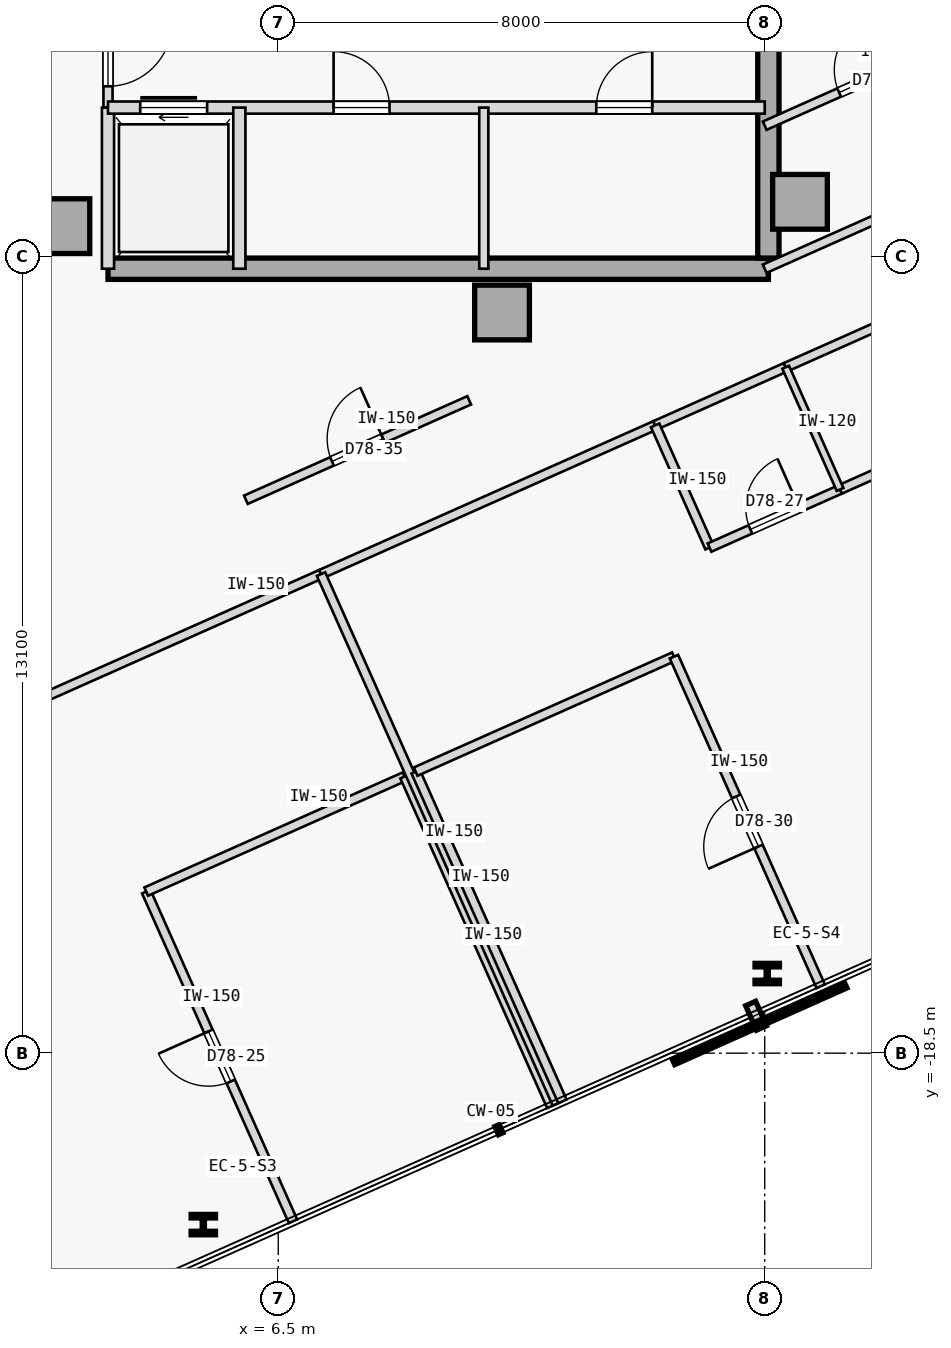
"""IFC4 building model, lengths in metres.
Left out: names, types, materials, properties, quantities, classifications, styles, units other than length and angle.
Written with IfcOpenShell. Run it as: python <this file> out.ifc"""

import sys

from ifc_helpers import new_model, si_unit, direction, frame, frame_2d, origin, origin_2d, place, context, subcontext, project, spatial, rectangle, i_section, extrude, element, fill, save


model = new_model("IFC4")
c1 = context("Model", 3, precision=1e-05, world=origin(), true_north=direction((0.0, 1.0)))
c2 = subcontext(c1, "Body", "Model", "MODEL_VIEW")
j1 = project(units=[si_unit("LENGTHUNIT", "METRE"), si_unit("PLANEANGLEUNIT", "RADIAN")], contexts=[c1])
p1 = place(None, origin())
s1 = spatial("IfcSite", under=j1, at=p1, CompositionType="ELEMENT")
p2 = place(p1, origin())
s2 = spatial("IfcBuilding", under=s1, at=p2, CompositionType="ELEMENT")
p3 = place(p2, frame((0.0, 0.0, 291.95)))
s3 = spatial("IfcBuildingStorey", under=s2, at=p3, CompositionType="ELEMENT", Elevation=291.95)
for number, where, z_axis, x_axis in (
    (1, (15.08, -4.5, 0.0), (0.0, 0.0, 1.0), (1.0, 0.0, 0.0)),
    (2, (10.18, -6.32, 0.0), (0.0, 0.0, 1.0), (1.0, 0.0, 0.0)),
    (3, (2.95, -4.9, 0.0), (0.0, 0.0, 1.0), (1.0, 0.0, 0.0)),
):
    element("IfcColumn", number, at=place(p3, frame(where, z_axis=z_axis, x_axis=x_axis)), inside=s3, PredefinedType="COLUMN", context=c2, shape_type="SweptSolid", body=[
        extrude(rectangle(XDim=0.9, YDim=0.9, at=origin_2d()), origin(), (0.0, 0.0, 1.0), 3.35),
    ])
p4 = place(p3, frame((3.7, -5.6, 0.0), z_axis=(0.0, 0.0, 1.0), x_axis=(1.0, 0.0, 0.0)))
e4 = element("IfcWall", 4, at=p4, inside=s3, PredefinedType="SHEAR", context=c2, shape_type="SweptSolid", body=[
    extrude(rectangle(XDim=10.86, YDim=0.35, at=frame_2d((5.43, 0.0))), origin(), (0.0, 0.0, 1.0), 3.125),
])
p5 = place(p3, frame((14.56, -5.425, 0.0), z_axis=(0.0, 0.0, 1.0), x_axis=(0.0, 1.0, 0.0)))
e5 = element("IfcWall", 5, at=p5, inside=s3, PredefinedType="SHEAR", context=c2, shape_type="SweptSolid", body=[
    extrude(rectangle(XDim=10.85, YDim=0.35, at=frame_2d((5.425, 0.0))), origin(), (0.0, 0.0, 1.0), 3.125),
])
for number, where, z_axis, x_axis in (
    (6, (5.268, -21.319, 0.0), (0.0, 0.0, 1.0), (1.0, 0.0, 0.0)),
    (7, (14.541, -17.19, 0.0), (0.0, 0.0, 1.0), (1.0, 0.0, 0.0)),
):
    element("IfcColumn", number, at=place(p3, frame(where, z_axis=z_axis, x_axis=x_axis)), inside=s3, PredefinedType="COLUMN", context=c2, shape_type="SweptSolid", body=[
        extrude(i_section(OverallWidth=0.401, OverallDepth=0.335, WebThickness=0.036, FlangeThickness=0.058, FilletRadius=0.015, at=origin_2d()), origin(), (0.0, 0.0, 1.0), 3.35),
    ])
p6 = place(p3, frame((3.7, -2.95, 0.0), z_axis=(0.0, 0.0, 1.0), x_axis=(0.0, 1.0, 0.0)))
e8 = element("IfcWall", 8, at=p6, inside=s3, PredefinedType="PARTITIONING", context=c2, shape_type="SweptSolid", body=[
    extrude(rectangle(XDim=1.8, YDim=0.15, at=frame_2d((0.9, 0.0))), origin(), (0.0, 0.0, 1.0), 3.125),
])
p7 = place(p6, frame((0.35, 0.0, 0.0)))
e9 = element("IfcOpeningElement", 9, at=p7, cuts=e8, PredefinedType="OPENING", context=c2, shape_type="SweptSolid", body=[
    extrude(rectangle(XDim=1.05, YDim=2.18, at=frame_2d((0.525, 1.09))), frame((0.0, 0.085, 0.0), z_axis=(0.0, -1.0, 0.0), x_axis=(1.0, 0.0, 0.0)), (0.0, 0.0, 1.0), 0.17),
])
p8 = place(p3, frame((3.7, -5.6, 0.0), z_axis=(0.0, 0.0, 1.0), x_axis=(0.0, 1.0, 0.0)))
e10 = element("IfcWall", 10, at=p8, inside=s3, PredefinedType="STANDARD", context=c2, shape_type="SweptSolid", body=[
    extrude(rectangle(XDim=2.65, YDim=0.2, at=frame_2d((1.325, 0.0))), origin(), (0.0, 0.0, 1.0), 3.125),
])
p9 = place(p3, frame((3.7, -2.95, 0.0), z_axis=(0.0, 0.0, 1.0), x_axis=(1.0, 0.0, 0.0)))
e11 = element("IfcWall", 11, at=p9, inside=s3, PredefinedType="STANDARD", context=c2, shape_type="SweptSolid", body=[
    extrude(rectangle(XDim=10.8, YDim=0.2, at=frame_2d((5.4, 0.0))), origin(), (0.0, 0.0, 1.0), 3.125),
])
p10 = place(p9, frame((0.53, 0.0, 0.0)))
e12 = element("IfcOpeningElement", 12, at=p10, cuts=e11, PredefinedType="OPENING", context=c2, shape_type="SweptSolid", body=[
    extrude(rectangle(XDim=1.1, YDim=2.15, at=frame_2d((0.55, 1.075))), frame((0.0, 0.11, 0.0), z_axis=(0.0, -1.0, 0.0), x_axis=(1.0, 0.0, 0.0)), (0.0, 0.0, 1.0), 0.22),
])
p11 = place(p9, frame((3.71, 0.0, 0.0)))
e13 = element("IfcOpeningElement", 13, at=p11, cuts=e11, PredefinedType="OPENING", context=c2, shape_type="SweptSolid", body=[
    extrude(rectangle(XDim=0.92, YDim=2.15, at=frame_2d((0.46, 1.075))), frame((0.0, 0.11, 0.0), z_axis=(0.0, -1.0, 0.0), x_axis=(1.0, 0.0, 0.0)), (0.0, 0.0, 1.0), 0.22),
])
p12 = place(p9, frame((8.03, 0.0, 0.0)))
e14 = element("IfcOpeningElement", 14, at=p12, cuts=e11, PredefinedType="OPENING", context=c2, shape_type="SweptSolid", body=[
    extrude(rectangle(XDim=0.92, YDim=2.15, at=frame_2d((0.46, 1.075))), frame((0.0, 0.11, 0.0), z_axis=(0.0, -1.0, 0.0), x_axis=(1.0, 0.0, 0.0)), (0.0, 0.0, 1.0), 0.22),
])
p13 = place(p3, frame((5.86, -5.6, 0.0), z_axis=(0.0, 0.0, 1.0), x_axis=(0.0, 1.0, 0.0)))
e15 = element("IfcWall", 15, at=p13, inside=s3, PredefinedType="STANDARD", context=c2, shape_type="SweptSolid", body=[
    extrude(rectangle(XDim=2.65, YDim=0.2, at=frame_2d((1.325, 0.0))), origin(), (0.0, 0.0, 1.0), 3.125),
])
p14 = place(p3, frame((9.88, -5.6, 0.0), z_axis=(0.0, 0.0, 1.0), x_axis=(0.0, 1.0, 0.0)))
e16 = element("IfcWall", 16, at=p14, inside=s3, PredefinedType="PARTITIONING", context=c2, shape_type="SweptSolid", body=[
    extrude(rectangle(XDim=2.65, YDim=0.15, at=frame_2d((1.325, 0.0))), origin(), (0.0, 0.0, 1.0), 3.125),
])
p15 = place(p3, frame((-4.445, -15.808, 0.0), z_axis=(0.0, 0.0, 1.0), x_axis=(0.913546853922, 0.406733506966, 0.0)))
e17 = element("IfcWall", 17, at=p15, inside=s3, PredefinedType="PARTITIONING", context=c2, shape_type="SweptSolid", body=[
    extrude(rectangle(XDim=12.751, YDim=0.15, at=frame_2d((6.375, 0.0))), origin(), (0.0, 0.0, 1.0), 3.125),
])
p16 = place(p15, frame((5.9, 0.0, 0.0)))
e18 = element("IfcOpeningElement", 18, at=p16, cuts=e17, PredefinedType="OPENING", context=c2, shape_type="SweptSolid", body=[
    extrude(rectangle(XDim=0.95, YDim=2.15, at=frame_2d((0.475, 1.075))), frame((0.0, 0.085, 0.0), z_axis=(0.0, -1.0, 0.0), x_axis=(1.0, 0.0, 0.0)), (0.0, 0.0, 1.0), 0.17),
])
p17 = place(p3, frame((7.204, -10.622, 0.0), z_axis=(0.0, 0.0, 1.0), x_axis=(0.913545172627, 0.406737283231, 0.0)))
e19 = element("IfcWall", 19, at=p17, inside=s3, PredefinedType="PARTITIONING", context=c2, shape_type="SweptSolid", body=[
    extrude(rectangle(XDim=6.014, YDim=0.15, at=frame_2d((3.007, 0.0))), origin(), (0.0, 0.0, 1.0), 3.125),
])
p18 = place(p3, frame((12.698, -8.176, 0.0), z_axis=(0.0, 0.0, 1.0), x_axis=(0.913558622212, 0.406707073682, 0.0)))
e20 = element("IfcWall", 20, at=p18, inside=s3, PredefinedType="PARTITIONING", context=c2, shape_type="SweptSolid", body=[
    extrude(rectangle(XDim=2.35, YDim=0.15, at=frame_2d((1.175, 0.0))), origin(), (0.0, 0.0, 1.0), 3.125),
])
p19 = place(p3, frame((14.844, -7.22, 0.0), z_axis=(0.0, 0.0, 1.0), x_axis=(0.913524337797, 0.406784075711, 0.0)))
e21 = element("IfcWall", 21, at=p19, inside=s3, PredefinedType="PARTITIONING", context=c2, shape_type="SweptSolid", body=[
    extrude(rectangle(XDim=4.35, YDim=0.15, at=frame_2d((2.175, 0.0))), origin(), (0.0, 0.0, 1.0), 3.125),
])
p20 = place(p3, frame((5.968, -9.399, 0.0), z_axis=(0.0, 0.0, 1.0), x_axis=(0.913563383118, 0.406696379412, 0.0)))
e22 = element("IfcWall", 22, at=p20, inside=s3, PredefinedType="PARTITIONING", context=c2, shape_type="SweptSolid", body=[
    extrude(rectangle(XDim=4.019, YDim=0.15, at=frame_2d((2.01, 0.0))), origin(), (0.0, 0.0, 1.0), 3.125),
])
p21 = place(p20, frame((1.55, 0.0, 0.0)))
e23 = element("IfcOpeningElement", 23, at=p21, cuts=e22, PredefinedType="OPENING", context=c2, shape_type="SweptSolid", body=[
    extrude(rectangle(XDim=0.92, YDim=2.15, at=frame_2d((0.46, 1.075))), frame((0.0, 0.085, 0.0), z_axis=(0.0, -1.0, 0.0), x_axis=(1.0, 0.0, 0.0)), (0.0, 0.0, 1.0), 0.17),
])
p22 = place(p3, frame((14.5, -5.6, 0.0), z_axis=(0.0, 0.0, 1.0), x_axis=(0.913550607208, 0.406725076766, 0.0)))
e24 = element("IfcWall", 24, at=p22, inside=s3, PredefinedType="PARTITIONING", context=c2, shape_type="SweptSolid", body=[
    extrude(rectangle(XDim=4.556, YDim=0.15, at=frame_2d((2.278, 0.0))), origin(), (0.0, 0.0, 1.0), 3.125),
])
p23 = place(p22, frame((2.501, 0.0, 0.0)))
e25 = element("IfcOpeningElement", 25, at=p23, cuts=e24, PredefinedType="OPENING", context=c2, shape_type="SweptSolid", body=[
    extrude(rectangle(XDim=0.92, YDim=2.15, at=frame_2d((0.46, 1.075))), frame((0.0, 0.085, 0.0), z_axis=(0.0, -1.0, 0.0), x_axis=(1.0, 0.0, 0.0)), (0.0, 0.0, 1.0), 0.17),
])
p24 = place(p3, frame((6.742, -21.265, 0.0), z_axis=(0.0, 0.0, 1.0), x_axis=(-0.406749048544, 0.913539934271, 0.0)))
e26 = element("IfcWall", 26, at=p24, inside=s3, PredefinedType="PARTITIONING", context=c2, shape_type="SweptSolid", body=[
    extrude(rectangle(XDim=5.935, YDim=0.15, at=frame_2d((2.968, 0.0))), origin(), (0.0, 0.0, 1.0), 3.125),
])
p25 = place(p24, frame((2.518, 0.0, 0.0)))
e27 = element("IfcOpeningElement", 27, at=p25, cuts=e26, PredefinedType="OPENING", context=c2, shape_type="SweptSolid", body=[
    extrude(rectangle(XDim=0.9, YDim=2.15, at=frame_2d((0.45, 1.075))), frame((0.0, 0.085, 0.0), z_axis=(0.0, -1.0, 0.0), x_axis=(1.0, 0.0, 0.0)), (0.0, 0.0, 1.0), 0.17),
])
p26 = place(p3, frame((4.328, -15.843, 0.0), z_axis=(0.0, 0.0, 1.0), x_axis=(0.91354505039, 0.40673755778, 0.0)))
e28 = element("IfcWall", 28, at=p26, inside=s3, PredefinedType="PARTITIONING", context=c2, shape_type="SweptSolid", body=[
    extrude(rectangle(XDim=4.65, YDim=0.15, at=frame_2d((2.325, 0.0))), origin(), (0.0, 0.0, 1.0), 3.125),
])
p27 = place(p3, frame((10.99, -19.373, 0.0), z_axis=(0.0, 0.0, 1.0), x_axis=(-0.406749048544, 0.913539934271, 0.0)))
e29 = element("IfcWall", 29, at=p27, inside=s3, PredefinedType="PARTITIONING", context=c2, shape_type="SweptSolid", body=[
    extrude(rectangle(XDim=5.935, YDim=0.15, at=frame_2d((2.968, 0.0))), origin(), (0.0, 0.0, 1.0), 3.125),
])
p28 = place(p3, frame((11.082, -19.333, 0.0), z_axis=(0.0, 0.0, 1.0), x_axis=(-0.406729927653, 0.913548447512, 0.0)))
e30 = element("IfcWall", 30, at=p28, inside=s3, PredefinedType="PARTITIONING", context=c2, shape_type="SweptSolid", body=[
    extrude(rectangle(XDim=9.535, YDim=0.15, at=frame_2d((4.768, 0.0))), origin(), (0.0, 0.0, 1.0), 3.125),
])
p29 = place(p3, frame((13.592, -10.186, 0.0), z_axis=(0.0, 0.0, 1.0), x_axis=(-0.406725294076, 0.913550510459, 0.0)))
e31 = element("IfcWall", 31, at=p29, inside=s3, PredefinedType="PARTITIONING", context=c2, shape_type="SweptSolid", body=[
    extrude(rectangle(XDim=2.2, YDim=0.15, at=frame_2d((1.1, 0.0))), origin(), (0.0, 0.0, 1.0), 3.125),
])
p30 = place(p3, frame((13.592, -10.186, 0.0), z_axis=(0.0, 0.0, 1.0), x_axis=(0.913558622212, 0.406707073682, 0.0)))
e32 = element("IfcWall", 32, at=p30, inside=s3, PredefinedType="PARTITIONING", context=c2, shape_type="SweptSolid", body=[
    extrude(rectangle(XDim=2.35, YDim=0.15, at=frame_2d((1.175, 0.0))), origin(), (0.0, 0.0, 1.0), 3.125),
])
p31 = place(p30, frame((0.735, 0.0, 0.0)))
e33 = element("IfcOpeningElement", 33, at=p31, cuts=e32, PredefinedType="OPENING", context=c2, shape_type="SweptSolid", body=[
    extrude(rectangle(XDim=0.88, YDim=2.15, at=frame_2d((0.44, 1.075))), frame((0.0, 0.085, 0.0), z_axis=(0.0, -1.0, 0.0), x_axis=(1.0, 0.0, 0.0)), (0.0, 0.0, 1.0), 0.17),
])
p32 = place(p3, frame((15.739, -9.23, 0.0), z_axis=(0.0, 0.0, 1.0), x_axis=(0.913545193015, 0.406737237438, 0.0)))
e34 = element("IfcWall", 34, at=p32, inside=s3, PredefinedType="PARTITIONING", context=c2, shape_type="SweptSolid", body=[
    extrude(rectangle(XDim=4.35, YDim=0.15, at=frame_2d((2.175, 0.0))), origin(), (0.0, 0.0, 1.0), 3.125),
])
p33 = place(p32, frame((1.725, 0.0, 0.0)))
e35 = element("IfcOpeningElement", 35, at=p33, cuts=e34, PredefinedType="OPENING", context=c2, shape_type="SweptSolid", body=[
    extrude(rectangle(XDim=0.9, YDim=2.15, at=frame_2d((0.45, 1.075))), frame((0.0, 0.085, 0.0), z_axis=(0.0, -1.0, 0.0), x_axis=(1.0, 0.0, 0.0)), (0.0, 0.0, 1.0), 0.17),
])
p34 = place(p3, frame((11.173, -19.292, 0.0), z_axis=(0.0, 0.0, 1.0), x_axis=(-0.406749048544, 0.913539934271, 0.0)))
e36 = element("IfcWall", 36, at=p34, inside=s3, PredefinedType="PARTITIONING", context=c2, shape_type="SweptSolid", body=[
    extrude(rectangle(XDim=5.935, YDim=0.15, at=frame_2d((2.968, 0.0))), origin(), (0.0, 0.0, 1.0), 3.125),
])
p35 = place(p3, frame((8.759, -13.87, 0.0), z_axis=(0.0, 0.0, 1.0), x_axis=(0.91354505039, 0.40673755778, 0.0)))
e37 = element("IfcWall", 37, at=p35, inside=s3, PredefinedType="PARTITIONING", context=c2, shape_type="SweptSolid", body=[
    extrude(rectangle(XDim=4.65, YDim=0.15, at=frame_2d((2.325, 0.0))), origin(), (0.0, 0.0, 1.0), 3.125),
])
p36 = place(p3, frame((15.421, -17.401, 0.0), z_axis=(0.0, 0.0, 1.0), x_axis=(-0.406749048544, 0.913539934271, 0.0)))
e38 = element("IfcWall", 38, at=p36, inside=s3, PredefinedType="PARTITIONING", context=c2, shape_type="SweptSolid", body=[
    extrude(rectangle(XDim=5.935, YDim=0.15, at=frame_2d((2.968, 0.0))), origin(), (0.0, 0.0, 1.0), 3.125),
])
p37 = place(p36, frame((2.518, 0.0, 0.0)))
e39 = element("IfcOpeningElement", 39, at=p37, cuts=e38, PredefinedType="OPENING", context=c2, shape_type="SweptSolid", body=[
    extrude(rectangle(XDim=0.9, YDim=2.15, at=frame_2d((0.45, 1.075))), frame((0.0, 0.085, 0.0), z_axis=(0.0, -1.0, 0.0), x_axis=(1.0, 0.0, 0.0)), (0.0, 0.0, 1.0), 0.17),
])
p38 = place(p3, frame((15.739, -9.23, 0.0), z_axis=(0.0, 0.0, 1.0), x_axis=(-0.406725294076, 0.913550510459, 0.0)))
e40 = element("IfcWall", 40, at=p38, inside=s3, PredefinedType="PARTITIONING", context=c2, shape_type="SweptSolid", body=[
    extrude(rectangle(XDim=2.2, YDim=0.12, at=frame_2d((1.1, 0.0))), origin(), (0.0, 0.0, 1.0), 3.125),
])
p39 = place(p3, frame((14.5, -3.248, 0.0), z_axis=(0.0, 0.0, 1.0), x_axis=(0.913542803573, 0.40674260416, 0.0)))
e41 = element("IfcWall", 41, at=p39, inside=s3, PredefinedType="PARTITIONING", context=c2, shape_type="SweptSolid", body=[
    extrude(rectangle(XDim=3.599, YDim=0.15, at=frame_2d((1.8, 0.0))), origin(), (0.0, 0.0, 1.0), 3.125),
])
p40 = place(p39, frame((1.34, 0.0, 0.0)))
e42 = element("IfcOpeningElement", 42, at=p40, cuts=e41, PredefinedType="OPENING", context=c2, shape_type="SweptSolid", body=[
    extrude(rectangle(XDim=0.92, YDim=2.15, at=frame_2d((0.46, 1.075))), frame((0.0, 0.085, 0.0), z_axis=(0.0, -1.0, 0.0), x_axis=(1.0, 0.0, 0.0)), (0.0, 0.0, 1.0), 0.17),
])
p41 = place(p7, frame((1.05, 0.0, 0.0), z_axis=(0.0, 0.0, 1.0), x_axis=(-1.0, 0.0, 0.0)))
e43 = element("IfcDoor", 43, at=p41, inside=s3, OperationType="SINGLE_SWING_RIGHT", PredefinedType="DOOR", context=c2, shape_type="SweptSolid", body=[
    extrude(rectangle(XDim=1.05, YDim=2.18, at=frame_2d((0.525, 1.09))), frame((0.0, 0.025, 0.0), z_axis=(0.0, -1.0, 0.0), x_axis=(1.0, 0.0, 0.0)), (0.0, 0.0, 1.0), 0.05),
])
fill(e9, e43)
p42 = place(p10, origin())
e44 = element("IfcDoor", 44, at=p42, inside=s3, OperationType="SLIDING_TO_RIGHT", PredefinedType="DOOR", context=c2, shape_type="SweptSolid", body=[
    extrude(rectangle(XDim=1.1, YDim=2.15, at=frame_2d((0.55, 1.075))), frame((0.0, 0.025, 0.0), z_axis=(0.0, -1.0, 0.0), x_axis=(1.0, 0.0, 0.0)), (0.0, 0.0, 1.0), 0.05),
])
fill(e12, e44)
p43 = place(p11, origin())
e45 = element("IfcDoor", 45, at=p43, inside=s3, OperationType="SINGLE_SWING_LEFT", PredefinedType="DOOR", context=c2, shape_type="SweptSolid", body=[
    extrude(rectangle(XDim=0.92, YDim=2.15, at=frame_2d((0.46, 1.075))), frame((0.0, 0.025, 0.0), z_axis=(0.0, -1.0, 0.0), x_axis=(1.0, 0.0, 0.0)), (0.0, 0.0, 1.0), 0.05),
])
fill(e13, e45)
p44 = place(p12, origin())
e46 = element("IfcDoor", 46, at=p44, inside=s3, OperationType="SINGLE_SWING_RIGHT", PredefinedType="DOOR", context=c2, shape_type="SweptSolid", body=[
    extrude(rectangle(XDim=0.92, YDim=2.15, at=frame_2d((0.46, 1.075))), frame((0.0, 0.025, 0.0), z_axis=(0.0, -1.0, 0.0), x_axis=(1.0, 0.0, 0.0)), (0.0, 0.0, 1.0), 0.05),
])
fill(e14, e46)
p45 = place(p25, origin())
e47 = element("IfcDoor", 47, at=p45, inside=s3, OperationType="SINGLE_SWING_RIGHT", PredefinedType="DOOR", context=c2, shape_type="SweptSolid", body=[
    extrude(rectangle(XDim=0.9, YDim=2.15, at=frame_2d((0.45, 1.075))), frame((0.0, 0.025, 0.0), z_axis=(0.0, -1.0, 0.0), x_axis=(1.0, 0.0, 0.0)), (0.0, 0.0, 1.0), 0.05),
])
fill(e27, e47)
p46 = place(p31, origin())
e48 = element("IfcDoor", 48, at=p46, inside=s3, OperationType="SINGLE_SWING_RIGHT", PredefinedType="DOOR", context=c2, shape_type="SweptSolid", body=[
    extrude(rectangle(XDim=0.88, YDim=2.15, at=frame_2d((0.44, 1.075))), frame((0.0, 0.025, 0.0), z_axis=(0.0, -1.0, 0.0), x_axis=(1.0, 0.0, 0.0)), (0.0, 0.0, 1.0), 0.05),
])
fill(e33, e48)
p47 = place(p37, origin())
e49 = element("IfcDoor", 49, at=p47, inside=s3, OperationType="SINGLE_SWING_LEFT", PredefinedType="DOOR", context=c2, shape_type="SweptSolid", body=[
    extrude(rectangle(XDim=0.9, YDim=2.15, at=frame_2d((0.45, 1.075))), frame((0.0, 0.025, 0.0), z_axis=(0.0, -1.0, 0.0), x_axis=(1.0, 0.0, 0.0)), (0.0, 0.0, 1.0), 0.05),
])
fill(e39, e49)
p48 = place(p21, origin())
e50 = element("IfcDoor", 50, at=p48, inside=s3, OperationType="SINGLE_SWING_RIGHT", PredefinedType="DOOR", context=c2, shape_type="SweptSolid", body=[
    extrude(rectangle(XDim=0.92, YDim=2.15, at=frame_2d((0.46, 1.075))), frame((0.0, 0.025, 0.0), z_axis=(0.0, -1.0, 0.0), x_axis=(1.0, 0.0, 0.0)), (0.0, 0.0, 1.0), 0.05),
])
fill(e23, e50)
p49 = place(p40, origin())
e51 = element("IfcDoor", 51, at=p49, inside=s3, OperationType="SINGLE_SWING_RIGHT", PredefinedType="DOOR", context=c2, shape_type="SweptSolid", body=[
    extrude(rectangle(XDim=0.92, YDim=2.15, at=frame_2d((0.46, 1.075))), frame((0.0, 0.025, 0.0), z_axis=(0.0, -1.0, 0.0), x_axis=(1.0, 0.0, 0.0)), (0.0, 0.0, 1.0), 0.05),
])
fill(e42, e51)
save(model, sys.argv[1])
